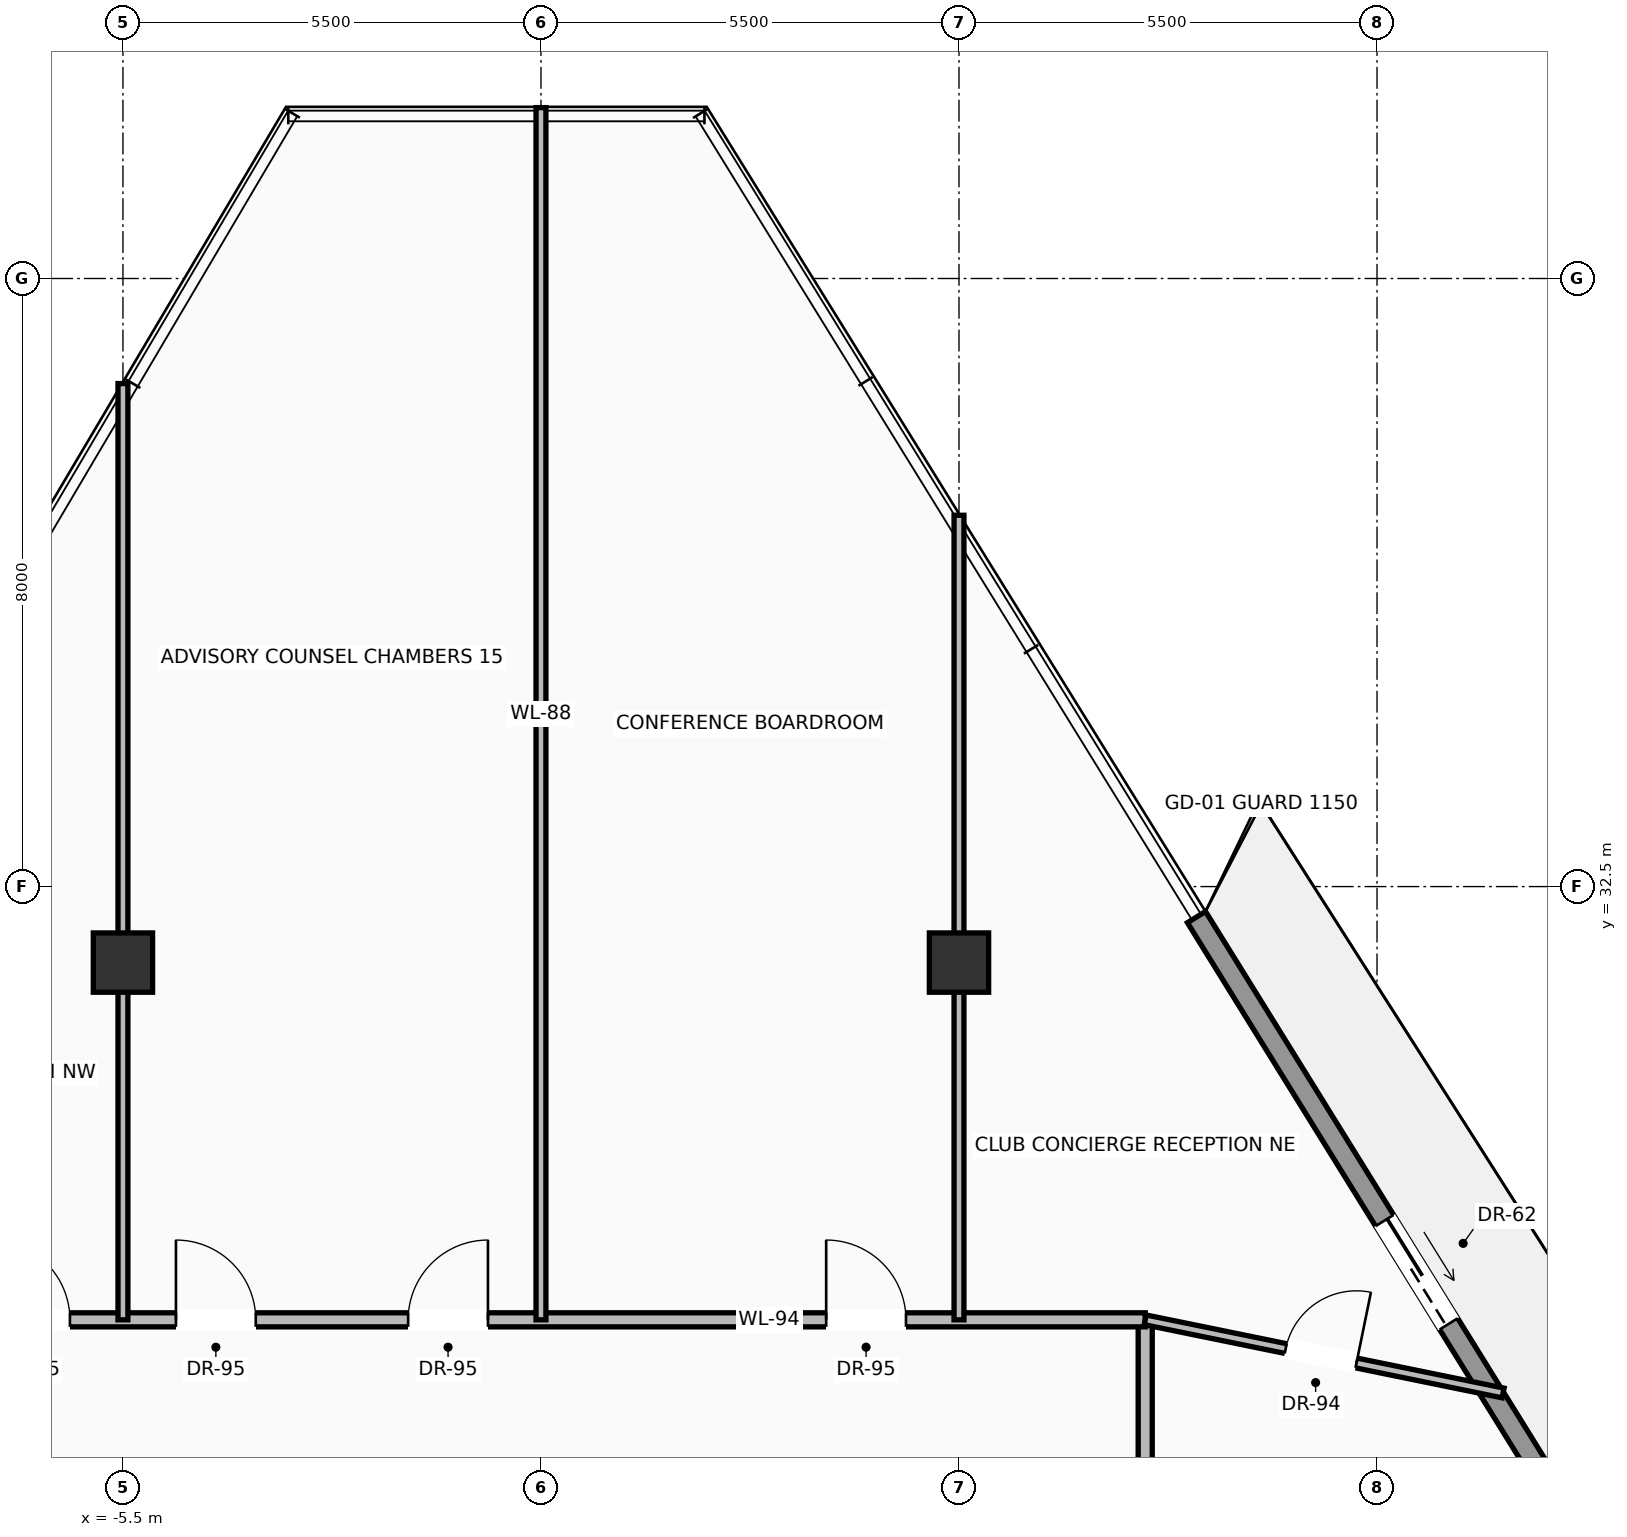
"""IFC4 building model, lengths in metres.
Left out: names, types, materials, properties, quantities, classifications, styles, units other than length and angle.
Written with IfcOpenShell. Run it as: python <this file> out.ifc"""

import sys

from ifc_helpers import new_model, si_unit, direction, frame, frame_2d, origin, origin_2d, place, context, subcontext, project, spatial, rectangle, extrude, source, transform, mapped, element, fill, save


model = new_model("IFC4")
c1 = context("Model", 3, precision=1e-05, world=origin(), true_north=direction((0.0, 1.0)))
c2 = subcontext(c1, "Body", "Model", "MODEL_VIEW")
j1 = project(units=[si_unit("LENGTHUNIT", "METRE"), si_unit("PLANEANGLEUNIT", "RADIAN")], contexts=[c1])
p1 = place(None, origin())
s1 = spatial("IfcSite", under=j1, at=p1, CompositionType="ELEMENT")
p2 = place(p1, origin())
s2 = spatial("IfcBuilding", under=s1, at=p2, CompositionType="ELEMENT")
p3 = place(p2, frame((0.0, 0.0, 233.8)))
s3 = spatial("IfcBuildingStorey", under=s2, at=p3, CompositionType="ELEMENT", Elevation=233.8)
m1 = source(origin(), c2, "Body", "SweptSolid", [
    extrude(rectangle(XDim=0.78, YDim=0.78, at=origin_2d()), origin(), (0.0, 0.0, 1.0), 3.45),
])
for number, where, z_axis, x_axis in (
    (1, (-5.5, 31.5, 0.0), (0.0, 0.0, 1.0), (1.0, 0.0, 0.0)),
    (2, (5.5, 31.5, 0.0), (0.0, 0.0, 1.0), (1.0, 0.0, 0.0)),
):
    element("IfcColumn", number, at=place(p3, frame(where, z_axis=z_axis, x_axis=x_axis)), inside=s3, PredefinedType="COLUMN", context=c2, shape_type="MappedRepresentation", body=[
        mapped(m1, transform((0.0, 0.0, 0.0), scale=1.0)),
    ])
p4 = place(p3, frame((8.625, 32.099, 0.0), z_axis=(0.0, 0.0, 1.0), x_axis=(0.526909754256, -0.849921238039, 0.0)))
e3 = element("IfcWall", 3, at=p4, inside=s3, PredefinedType="SOLIDWALL", context=c2, shape_type="SweptSolid", body=[
    extrude(rectangle(XDim=19.572, YDim=0.28, at=frame_2d((9.786, 0.0))), origin(), (0.0, 0.0, 1.0), 2.82),
])
p5 = place(p4, frame((4.697, 0.0, 0.0)))
e4 = element("IfcOpeningElement", 4, at=p5, cuts=e3, PredefinedType="OPENING", context=c2, shape_type="SweptSolid", body=[
    extrude(rectangle(XDim=1.6, YDim=2.35, at=frame_2d((0.8, 1.175))), frame((0.0, 0.15, 0.0), z_axis=(0.0, -1.0, 0.0), x_axis=(1.0, 0.0, 0.0)), (0.0, 0.0, 1.0), 0.3),
])
p6 = place(p4, frame((13.309, 0.0, 0.9)))
e5 = element("IfcOpeningElement", 5, at=p6, cuts=e3, PredefinedType="OPENING", context=c2, shape_type="SweptSolid", body=[
    extrude(rectangle(XDim=2.0, YDim=1.75, at=frame_2d((1.0, 0.875))), frame((0.0, 0.15, 0.0), z_axis=(0.0, -1.0, 0.0), x_axis=(1.0, 0.0, 0.0)), (0.0, 0.0, 1.0), 0.3),
])
p7 = place(p3, frame((7.95, 16.3, 0.0), z_axis=(0.0, 0.0, 1.0), x_axis=(0.0, 1.0, 0.0)))
e6 = element("IfcWall", 6, at=p7, inside=s3, PredefinedType="PARTITIONING", context=c2, shape_type="SweptSolid", body=[
    extrude(rectangle(XDim=10.5, YDim=0.185, at=frame_2d((5.25, 0.0))), origin(), (0.0, 0.0, 1.0), 3.232),
])
p8 = place(p7, frame((3.088, 0.0, 0.0)))
e7 = element("IfcOpeningElement", 7, at=p8, cuts=e6, PredefinedType="OPENING", context=c2, shape_type="SweptSolid", body=[
    extrude(rectangle(XDim=1.05, YDim=2.25, at=frame_2d((0.525, 1.125))), frame((0.0, 0.103, 0.0), z_axis=(0.0, -1.0, 0.0), x_axis=(1.0, 0.0, 0.0)), (0.0, 0.0, 1.0), 0.205),
])
p9 = place(p3, frame((-8.65, 26.8, 0.0), z_axis=(0.0, 0.0, 1.0), x_axis=(1.0, 0.0, 0.0)))
e8 = element("IfcWall", 8, at=p9, inside=s3, PredefinedType="PARTITIONING", context=c2, shape_type="SweptSolid", body=[
    extrude(rectangle(XDim=16.6, YDim=0.185, at=frame_2d((8.3, 0.0))), origin(), (0.0, 0.0, 1.0), 3.232),
])
p10 = place(p9, frame((3.847, 0.0, 0.0)))
e9 = element("IfcOpeningElement", 9, at=p10, cuts=e8, PredefinedType="OPENING", context=c2, shape_type="SweptSolid", body=[
    extrude(rectangle(XDim=1.05, YDim=2.25, at=frame_2d((0.525, 1.125))), frame((0.0, 0.103, 0.0), z_axis=(0.0, -1.0, 0.0), x_axis=(1.0, 0.0, 0.0)), (0.0, 0.0, 1.0), 0.205),
])
p11 = place(p9, frame((6.903, 0.0, 0.0)))
e10 = element("IfcOpeningElement", 10, at=p11, cuts=e8, PredefinedType="OPENING", context=c2, shape_type="SweptSolid", body=[
    extrude(rectangle(XDim=1.05, YDim=2.25, at=frame_2d((0.525, 1.125))), frame((0.0, 0.103, 0.0), z_axis=(0.0, -1.0, 0.0), x_axis=(1.0, 0.0, 0.0)), (0.0, 0.0, 1.0), 0.205),
])
p12 = place(p9, frame((12.403, 0.0, 0.0)))
e11 = element("IfcOpeningElement", 11, at=p12, cuts=e8, PredefinedType="OPENING", context=c2, shape_type="SweptSolid", body=[
    extrude(rectangle(XDim=1.05, YDim=2.25, at=frame_2d((0.525, 1.125))), frame((0.0, 0.103, 0.0), z_axis=(0.0, -1.0, 0.0), x_axis=(1.0, 0.0, 0.0)), (0.0, 0.0, 1.0), 0.205),
])
p13 = place(p9, frame((1.403, 0.0, 0.0)))
e12 = element("IfcOpeningElement", 12, at=p13, cuts=e8, PredefinedType="OPENING", context=c2, shape_type="SweptSolid", body=[
    extrude(rectangle(XDim=1.05, YDim=2.25, at=frame_2d((0.525, 1.125))), frame((0.0, 0.103, 0.0), z_axis=(0.0, -1.0, 0.0), x_axis=(1.0, 0.0, 0.0)), (0.0, 0.0, 1.0), 0.205),
])
p14 = place(p3, frame((7.95, 26.8, 0.0), z_axis=(0.0, 0.0, 1.0), x_axis=(0.979737591197, -0.200285427317, 0.0)))
e13 = element("IfcWall", 13, at=p14, inside=s3, PredefinedType="PARTITIONING", context=c2, shape_type="SweptSolid", body=[
    extrude(rectangle(XDim=4.806, YDim=0.13, at=frame_2d((2.403, 0.0))), origin(), (0.0, 0.0, 1.0), 3.232),
])
p15 = place(p14, frame((1.887, 0.0, 0.0)))
e14 = element("IfcOpeningElement", 14, at=p15, cuts=e13, PredefinedType="OPENING", context=c2, shape_type="SweptSolid", body=[
    extrude(rectangle(XDim=0.95, YDim=2.2, at=frame_2d((0.475, 1.1))), frame((0.0, 0.075, 0.0), z_axis=(0.0, -1.0, 0.0), x_axis=(1.0, 0.0, 0.0)), (0.0, 0.0, 1.0), 0.15),
])
p16 = place(p3, frame((-5.5, 26.8, 0.0), z_axis=(0.0, 0.0, 1.0), x_axis=(0.0, 1.0, 0.0)))
e15 = element("IfcWall", 15, at=p16, inside=s3, PredefinedType="PARTITIONING", context=c2, shape_type="SweptSolid", body=[
    extrude(rectangle(XDim=12.318, YDim=0.13, at=frame_2d((6.159, 0.0))), origin(), (0.0, 0.0, 1.0), 2.683),
])
p17 = place(p3, frame((5.5, 26.8, 0.0), z_axis=(0.0, 0.0, 1.0), x_axis=(0.0, 1.0, 0.0)))
e16 = element("IfcWall", 16, at=p17, inside=s3, PredefinedType="PARTITIONING", context=c2, shape_type="SweptSolid", body=[
    extrude(rectangle(XDim=10.585, YDim=0.13, at=frame_2d((5.292, 0.0))), origin(), (0.0, 0.0, 1.0), 2.683),
])
p18 = place(p3, frame((0.0, 26.8, 0.0), z_axis=(0.0, 0.0, 1.0), x_axis=(0.0, 1.0, 0.0)))
e17 = element("IfcWall", 17, at=p18, inside=s3, PredefinedType="PARTITIONING", context=c2, shape_type="SweptSolid", body=[
    extrude(rectangle(XDim=15.948, YDim=0.13, at=frame_2d((7.974, 0.0))), origin(), (0.0, 0.0, 1.0), 3.232),
])
m2 = source(origin(), c2, "Body", "SweptSolid", [
    extrude(rectangle(XDim=1.6, YDim=2.35, at=frame_2d((0.8, 1.175))), frame((0.0, 0.025, 0.0), z_axis=(0.0, -1.0, 0.0), x_axis=(1.0, 0.0, 0.0)), (0.0, 0.0, 1.0), 0.05),
])
p19 = place(p5, origin())
e18 = element("IfcDoor", 18, at=p19, inside=s3, OperationType="SLIDING_TO_RIGHT", PredefinedType="DOOR", context=c2, shape_type="MappedRepresentation", body=[
    mapped(m2, transform((0.0, 0.0, 0.0), scale=1.0)),
])
fill(e4, e18)
m3 = source(origin(), c2, "Body", "SweptSolid", [
    extrude(rectangle(XDim=1.05, YDim=2.25, at=frame_2d((0.525, 1.125))), frame((0.0, 0.025, 0.0), z_axis=(0.0, -1.0, 0.0), x_axis=(1.0, 0.0, 0.0)), (0.0, 0.0, 1.0), 0.05),
])
p20 = place(p10, origin())
e19 = element("IfcDoor", 19, at=p20, inside=s3, OperationType="SINGLE_SWING_LEFT", PredefinedType="DOOR", context=c2, shape_type="MappedRepresentation", body=[
    mapped(m3, transform((0.0, 0.0, 0.0), scale=1.0)),
])
fill(e9, e19)
p21 = place(p11, origin())
e20 = element("IfcDoor", 20, at=p21, inside=s3, OperationType="SINGLE_SWING_RIGHT", PredefinedType="DOOR", context=c2, shape_type="MappedRepresentation", body=[
    mapped(m3, transform((0.0, 0.0, 0.0), scale=1.0)),
])
fill(e10, e20)
p22 = place(p12, origin())
e21 = element("IfcDoor", 21, at=p22, inside=s3, OperationType="SINGLE_SWING_LEFT", PredefinedType="DOOR", context=c2, shape_type="MappedRepresentation", body=[
    mapped(m3, transform((0.0, 0.0, 0.0), scale=1.0)),
])
fill(e11, e21)
m4 = source(origin(), c2, "Body", "SweptSolid", [
    extrude(rectangle(XDim=0.95, YDim=2.2, at=frame_2d((0.475, 1.1))), frame((0.0, 0.025, 0.0), z_axis=(0.0, -1.0, 0.0), x_axis=(1.0, 0.0, 0.0)), (0.0, 0.0, 1.0), 0.05),
])
p23 = place(p15, origin())
e22 = element("IfcDoor", 22, at=p23, inside=s3, OperationType="SINGLE_SWING_RIGHT", PredefinedType="DOOR", context=c2, shape_type="MappedRepresentation", body=[
    mapped(m4, transform((0.0, 0.0, 0.0), scale=1.0)),
])
fill(e14, e22)
p24 = place(p13, origin())
e23 = element("IfcDoor", 23, at=p24, inside=s3, OperationType="SINGLE_SWING_LEFT", PredefinedType="DOOR", context=c2, shape_type="MappedRepresentation", body=[
    mapped(m3, transform((0.0, 0.0, 0.0), scale=1.0)),
])
fill(e12, e23)
save(model, sys.argv[1])
